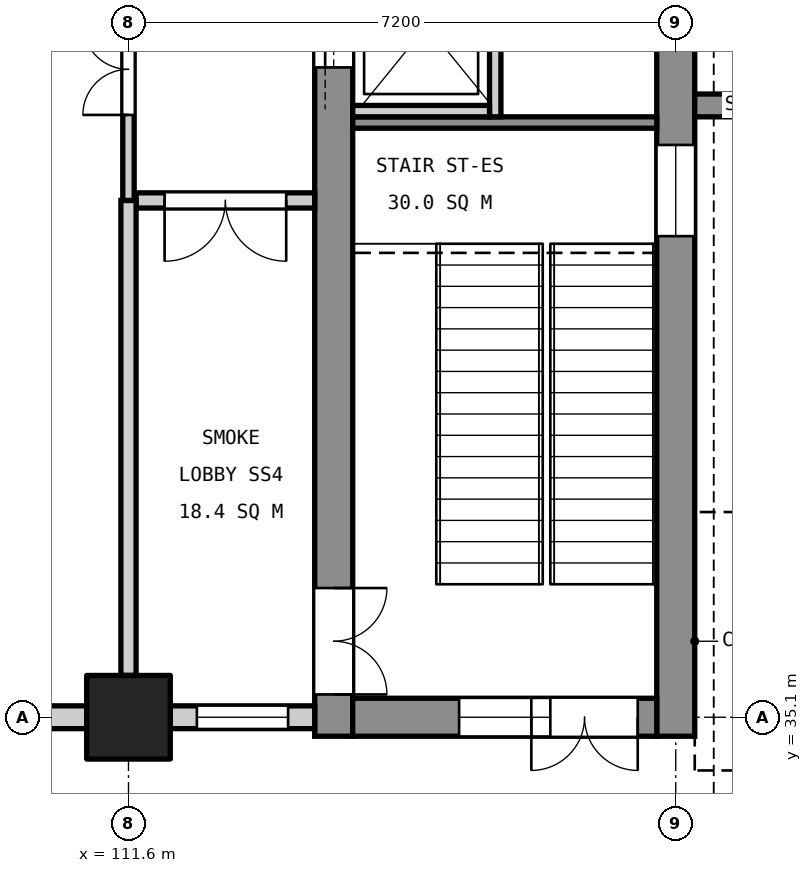
"""IFC4 building model, lengths in metres.
Left out: names, types, materials, properties, quantities, classifications, styles, units other than length and angle.
Written with IfcOpenShell. Run it as: python <this file> out.ifc"""

import sys

from ifc_helpers import new_model, si_unit, direction, frame, frame_2d, origin, origin_2d, place, context, subcontext, project, spatial, rectangle, extrude, element, fill, save


model = new_model("IFC4")
c1 = context("Model", 3, precision=1e-05, world=origin(), true_north=direction((0.0, 1.0)))
c2 = subcontext(c1, "Body", "Model", "MODEL_VIEW")
j1 = project(units=[si_unit("LENGTHUNIT", "METRE"), si_unit("PLANEANGLEUNIT", "RADIAN")], contexts=[c1])
p1 = place(None, origin())
s1 = spatial("IfcSite", under=j1, at=p1, CompositionType="ELEMENT")
p2 = place(p1, origin())
s2 = spatial("IfcBuilding", under=s1, at=p2, CompositionType="ELEMENT")
p3 = place(p2, origin())
s3 = spatial("IfcBuildingStorey", under=s2, at=p3, CompositionType="ELEMENT", Elevation=0.0)
p4 = place(p3, frame((111.6, 35.1, 0.0), z_axis=(0.0, 0.0, 1.0), x_axis=(1.0, 0.0, 0.0)))
e1 = element("IfcColumn", 1, at=p4, inside=s3, PredefinedType="COLUMN", context=c2, shape_type="SweptSolid", body=[
    extrude(rectangle(XDim=1.1, YDim=1.1, at=origin_2d()), origin(), (0.0, 0.0, 1.0), 6.0),
])
p5 = place(p3, frame((118.8, 34.85, 0.0), z_axis=(0.0, 0.0, 1.0), x_axis=(0.0, 1.0, 0.0)))
e2 = element("IfcWall", 2, at=p5, inside=s3, PredefinedType="SHEAR", context=c2, shape_type="SweptSolid", body=[
    extrude(rectangle(XDim=11.3, YDim=0.5, at=frame_2d((5.65, 0.0))), origin(), (0.0, 0.0, 1.0), 5.7),
])
p6 = place(p5, frame((6.58, 0.0, 3.4)))
e3 = element("IfcOpeningElement", 3, at=p6, cuts=e2, PredefinedType="OPENING", context=c2, shape_type="SweptSolid", body=[
    extrude(rectangle(XDim=1.2, YDim=0.9, at=frame_2d((0.6, 0.45))), frame((0.0, 0.26, 0.0), z_axis=(0.0, -1.0, 0.0), x_axis=(1.0, 0.0, 0.0)), (0.0, 0.0, 1.0), 0.52),
])
p7 = place(p3, frame((114.3, 34.85, 0.0), z_axis=(0.0, 0.0, 1.0), x_axis=(0.0, 1.0, 0.0)))
e4 = element("IfcWall", 4, at=p7, inside=s3, PredefinedType="SHEAR", context=c2, shape_type="SweptSolid", body=[
    extrude(rectangle(XDim=11.3, YDim=0.5, at=frame_2d((5.65, 0.0))), origin(), (0.0, 0.0, 1.0), 5.7),
])
p8 = place(p7, frame((0.55, 0.0, 0.0)))
e5 = element("IfcOpeningElement", 5, at=p8, cuts=e4, PredefinedType="OPENING", context=c2, shape_type="SweptSolid", body=[
    extrude(rectangle(XDim=1.4, YDim=2.1, at=frame_2d((0.7, 1.05))), frame((0.0, 0.26, 0.0), z_axis=(0.0, -1.0, 0.0), x_axis=(1.0, 0.0, 0.0)), (0.0, 0.0, 1.0), 0.52),
])
p9 = place(p7, frame((8.8, 0.0, 0.0)))
e6 = element("IfcOpeningElement", 6, at=p9, cuts=e4, PredefinedType="OPENING", context=c2, shape_type="SweptSolid", body=[
    extrude(rectangle(XDim=1.1, YDim=2.1, at=frame_2d((0.55, 1.05))), frame((0.0, 0.26, 0.0), z_axis=(0.0, -1.0, 0.0), x_axis=(1.0, 0.0, 0.0)), (0.0, 0.0, 1.0), 0.52),
])
p10 = place(p3, frame((118.55, 35.1, 0.0), z_axis=(0.0, 0.0, 1.0), x_axis=(-1.0, 0.0, 0.0)))
e7 = element("IfcWall", 7, at=p10, inside=s3, PredefinedType="SHEAR", context=c2, shape_type="SweptSolid", body=[
    extrude(rectangle(XDim=4.0, YDim=0.5, at=frame_2d((2.0, 0.0))), origin(), (0.0, 0.0, 1.0), 5.7),
])
p11 = place(p10, frame((0.25, 0.0, 0.0)))
e8 = element("IfcOpeningElement", 8, at=p11, cuts=e7, PredefinedType="OPENING", context=c2, shape_type="SweptSolid", body=[
    extrude(rectangle(XDim=1.4, YDim=2.1, at=frame_2d((0.7, 1.05))), frame((0.0, 0.26, 0.0), z_axis=(0.0, -1.0, 0.0), x_axis=(1.0, 0.0, 0.0)), (0.0, 0.0, 1.0), 0.52),
])
p12 = place(p10, frame((1.4, 0.0, 3.4)))
e9 = element("IfcOpeningElement", 9, at=p12, cuts=e7, PredefinedType="OPENING", context=c2, shape_type="SweptSolid", body=[
    extrude(rectangle(XDim=1.2, YDim=0.9, at=frame_2d((0.6, 0.45))), frame((0.0, 0.26, 0.0), z_axis=(0.0, -1.0, 0.0), x_axis=(1.0, 0.0, 0.0)), (0.0, 0.0, 1.0), 0.52),
])
p13 = place(p3, frame((119.05, 43.15, 0.0), z_axis=(0.0, 0.0, 1.0), x_axis=(1.0, 0.0, 0.0)))
e10 = element("IfcWall", 10, at=p13, inside=s3, PredefinedType="SHEAR", context=c2, shape_type="SweptSolid", body=[
    extrude(rectangle(XDim=1.25, YDim=0.3, at=frame_2d((0.625, 0.0))), origin(), (0.0, 0.0, 1.0), 6.0),
])
p14 = place(p3, frame((118.55, 42.925, 0.0), z_axis=(0.0, 0.0, 1.0), x_axis=(-1.0, 0.0, 0.0)))
e11 = element("IfcWall", 11, at=p14, inside=s3, PredefinedType="SOLIDWALL", context=c2, shape_type="SweptSolid", body=[
    extrude(rectangle(XDim=4.0, YDim=0.15, at=frame_2d((2.0, 0.0))), origin(), (0.0, 0.0, 1.0), 5.7),
])
p15 = place(p3, frame((116.425, 43.0, 0.0), z_axis=(0.0, 0.0, 1.0), x_axis=(0.0, 1.0, 0.0)))
e12 = element("IfcWall", 12, at=p15, inside=s3, PredefinedType="SOLIDWALL", context=c2, shape_type="SweptSolid", body=[
    extrude(rectangle(XDim=2.65, YDim=0.15, at=frame_2d((1.325, 0.0))), origin(), (0.0, 0.0, 1.0), 6.0),
])
p16 = place(p3, frame((116.35, 43.075, 0.0), z_axis=(0.0, 0.0, 1.0), x_axis=(-1.0, 0.0, 0.0)))
e13 = element("IfcWall", 13, at=p16, inside=s3, PredefinedType="SOLIDWALL", context=c2, shape_type="SweptSolid", body=[
    extrude(rectangle(XDim=1.8, YDim=0.15, at=frame_2d((0.9, 0.0))), origin(), (0.0, 0.0, 1.0), 6.0),
])
p17 = place(p3, frame((114.05, 35.1, 0.0), z_axis=(0.0, 0.0, 1.0), x_axis=(-1.0, 0.0, 0.0)))
e14 = element("IfcWall", 14, at=p17, inside=s3, PredefinedType="STANDARD", context=c2, shape_type="SweptSolid", body=[
    extrude(rectangle(XDim=1.9, YDim=0.3, at=frame_2d((0.95, 0.0))), origin(), (0.0, 0.0, 1.0), 4.9),
])
p18 = place(p17, frame((0.35, 0.0, 0.9)))
e15 = element("IfcOpeningElement", 15, at=p18, cuts=e14, PredefinedType="OPENING", context=c2, shape_type="SweptSolid", body=[
    extrude(rectangle(XDim=1.2, YDim=2.4, at=frame_2d((0.6, 1.2))), frame((0.0, 0.16, 0.0), z_axis=(0.0, -1.0, 0.0), x_axis=(1.0, 0.0, 0.0)), (0.0, 0.0, 1.0), 0.32),
])
p19 = place(p3, frame((111.05, 35.1, 0.0), z_axis=(0.0, 0.0, 1.0), x_axis=(-1.0, 0.0, 0.0)))
e16 = element("IfcWall", 16, at=p19, inside=s3, PredefinedType="STANDARD", context=c2, shape_type="SweptSolid", body=[
    extrude(rectangle(XDim=9.7, YDim=0.3, at=frame_2d((4.85, 0.0))), origin(), (0.0, 0.0, 1.0), 4.9),
])
p20 = place(p19, frame((0.625, 0.0, 0.9)))
e17 = element("IfcOpeningElement", 17, at=p20, cuts=e16, PredefinedType="OPENING", context=c2, shape_type="SweptSolid", body=[
    extrude(rectangle(XDim=1.8, YDim=3.0, at=frame_2d((0.9, 1.5))), frame((0.0, 0.16, 0.0), z_axis=(0.0, -1.0, 0.0), x_axis=(1.0, 0.0, 0.0)), (0.0, 0.0, 1.0), 0.32),
])
p21 = place(p19, frame((3.95, 0.0, 0.9)))
e18 = element("IfcOpeningElement", 18, at=p21, cuts=e16, PredefinedType="OPENING", context=c2, shape_type="SweptSolid", body=[
    extrude(rectangle(XDim=1.8, YDim=3.0, at=frame_2d((0.9, 1.5))), frame((0.0, 0.16, 0.0), z_axis=(0.0, -1.0, 0.0), x_axis=(1.0, 0.0, 0.0)), (0.0, 0.0, 1.0), 0.32),
])
p22 = place(p19, frame((7.275, 0.0, 0.9)))
e19 = element("IfcOpeningElement", 19, at=p22, cuts=e16, PredefinedType="OPENING", context=c2, shape_type="SweptSolid", body=[
    extrude(rectangle(XDim=1.8, YDim=3.0, at=frame_2d((0.9, 1.5))), frame((0.0, 0.16, 0.0), z_axis=(0.0, -1.0, 0.0), x_axis=(1.0, 0.0, 0.0)), (0.0, 0.0, 1.0), 0.32),
])
p23 = place(p3, frame((114.05, 41.9, 0.0), z_axis=(0.0, 0.0, 1.0), x_axis=(-1.0, 0.0, 0.0)))
e20 = element("IfcWall", 20, at=p23, inside=s3, PredefinedType="PARTITIONING", context=c2, shape_type="SweptSolid", body=[
    extrude(rectangle(XDim=2.35, YDim=0.2, at=frame_2d((1.175, 0.0))), origin(), (0.0, 0.0, 1.0), 4.6),
])
p24 = place(p23, frame((0.375, 0.0, 0.0)))
e21 = element("IfcOpeningElement", 21, at=p24, cuts=e20, PredefinedType="OPENING", context=c2, shape_type="SweptSolid", body=[
    extrude(rectangle(XDim=1.6, YDim=2.1, at=frame_2d((0.8, 1.05))), frame((0.0, 0.11, 0.0), z_axis=(0.0, -1.0, 0.0), x_axis=(1.0, 0.0, 0.0)), (0.0, 0.0, 1.0), 0.22),
])
p25 = place(p3, frame((111.6, 35.65, 0.0), z_axis=(0.0, 0.0, 1.0), x_axis=(0.0, 1.0, 0.0)))
e22 = element("IfcWall", 22, at=p25, inside=s3, PredefinedType="PARTITIONING", context=c2, shape_type="SweptSolid", body=[
    extrude(rectangle(XDim=6.25, YDim=0.2, at=frame_2d((3.125, 0.0))), origin(), (0.0, 0.0, 1.0), 4.6),
])
p26 = place(p3, frame((111.6, 41.9, 0.0), z_axis=(0.0, 0.0, 1.0), x_axis=(0.0, 1.0, 0.0)))
e23 = element("IfcWall", 23, at=p26, inside=s3, PredefinedType="PARTITIONING", context=c2, shape_type="SweptSolid", body=[
    extrude(rectangle(XDim=3.45, YDim=0.15, at=frame_2d((1.725, 0.0))), origin(), (0.0, 0.0, 1.0), 4.6),
])
p27 = place(p26, frame((1.125, 0.0, 0.0)))
e24 = element("IfcOpeningElement", 24, at=p27, cuts=e23, PredefinedType="OPENING", context=c2, shape_type="SweptSolid", body=[
    extrude(rectangle(XDim=1.2, YDim=2.1, at=frame_2d((0.6, 1.05))), frame((0.0, 0.085, 0.0), z_axis=(0.0, -1.0, 0.0), x_axis=(1.0, 0.0, 0.0)), (0.0, 0.0, 1.0), 0.17),
])
p28 = place(p8, frame((1.4, 0.0, 0.0), z_axis=(0.0, 0.0, 1.0), x_axis=(-1.0, 0.0, 0.0)))
e25 = element("IfcDoor", 25, at=p28, inside=s3, OperationType="DOUBLE_DOOR_SINGLE_SWING", PredefinedType="DOOR", context=c2, shape_type="SweptSolid", body=[
    extrude(rectangle(XDim=1.4, YDim=2.1, at=frame_2d((0.7, 1.05))), frame((0.0, 0.025, 0.0), z_axis=(0.0, -1.0, 0.0), x_axis=(1.0, 0.0, 0.0)), (0.0, 0.0, 1.0), 0.05),
])
fill(e5, e25)
p29 = place(p11, origin())
e26 = element("IfcDoor", 26, at=p29, inside=s3, OperationType="DOUBLE_DOOR_SINGLE_SWING", PredefinedType="DOOR", context=c2, shape_type="SweptSolid", body=[
    extrude(rectangle(XDim=1.4, YDim=2.1, at=frame_2d((0.7, 1.05))), frame((0.0, 0.025, 0.0), z_axis=(0.0, -1.0, 0.0), x_axis=(1.0, 0.0, 0.0)), (0.0, 0.0, 1.0), 0.05),
])
fill(e8, e26)
p30 = place(p9, origin())
e27 = element("IfcDoor", 27, at=p30, inside=s3, OperationType="SLIDING_TO_LEFT", PredefinedType="DOOR", context=c2, shape_type="SweptSolid", body=[
    extrude(rectangle(XDim=1.1, YDim=2.1, at=frame_2d((0.55, 1.05))), frame((0.0, 0.025, 0.0), z_axis=(0.0, -1.0, 0.0), x_axis=(1.0, 0.0, 0.0)), (0.0, 0.0, 1.0), 0.05),
])
fill(e6, e27)
p31 = place(p18, origin())
e28 = element("IfcWindow", 28, at=p31, inside=s3, PartitioningType="SINGLE_PANEL", PredefinedType="WINDOW", context=c2, shape_type="SweptSolid", body=[
    extrude(rectangle(XDim=1.2, YDim=2.4, at=frame_2d((0.6, 1.2))), frame((0.0, 0.03, 0.0), z_axis=(0.0, -1.0, 0.0), x_axis=(1.0, 0.0, 0.0)), (0.0, 0.0, 1.0), 0.06),
])
fill(e15, e28)
p32 = place(p6, origin())
e29 = element("IfcWindow", 29, at=p32, inside=s3, PartitioningType="SINGLE_PANEL", PredefinedType="WINDOW", context=c2, shape_type="SweptSolid", body=[
    extrude(rectangle(XDim=1.2, YDim=0.9, at=frame_2d((0.6, 0.45))), frame((0.0, 0.03, 0.0), z_axis=(0.0, -1.0, 0.0), x_axis=(1.0, 0.0, 0.0)), (0.0, 0.0, 1.0), 0.06),
])
fill(e3, e29)
p33 = place(p12, origin())
e30 = element("IfcWindow", 30, at=p33, inside=s3, PartitioningType="SINGLE_PANEL", PredefinedType="WINDOW", context=c2, shape_type="SweptSolid", body=[
    extrude(rectangle(XDim=1.2, YDim=0.9, at=frame_2d((0.6, 0.45))), frame((0.0, 0.03, 0.0), z_axis=(0.0, -1.0, 0.0), x_axis=(1.0, 0.0, 0.0)), (0.0, 0.0, 1.0), 0.06),
])
fill(e9, e30)
p34 = place(p27, origin())
e31 = element("IfcDoor", 31, at=p34, inside=s3, OperationType="DOUBLE_DOOR_SINGLE_SWING", PredefinedType="DOOR", context=c2, shape_type="SweptSolid", body=[
    extrude(rectangle(XDim=1.2, YDim=2.1, at=frame_2d((0.6, 1.05))), frame((0.0, 0.025, 0.0), z_axis=(0.0, -1.0, 0.0), x_axis=(1.0, 0.0, 0.0)), (0.0, 0.0, 1.0), 0.05),
])
fill(e24, e31)
p35 = place(p24, origin())
e32 = element("IfcDoor", 32, at=p35, inside=s3, OperationType="DOUBLE_DOOR_SINGLE_SWING", PredefinedType="DOOR", context=c2, shape_type="SweptSolid", body=[
    extrude(rectangle(XDim=1.6, YDim=2.1, at=frame_2d((0.8, 1.05))), frame((0.0, 0.025, 0.0), z_axis=(0.0, -1.0, 0.0), x_axis=(1.0, 0.0, 0.0)), (0.0, 0.0, 1.0), 0.05),
])
fill(e21, e32)
save(model, sys.argv[1])
